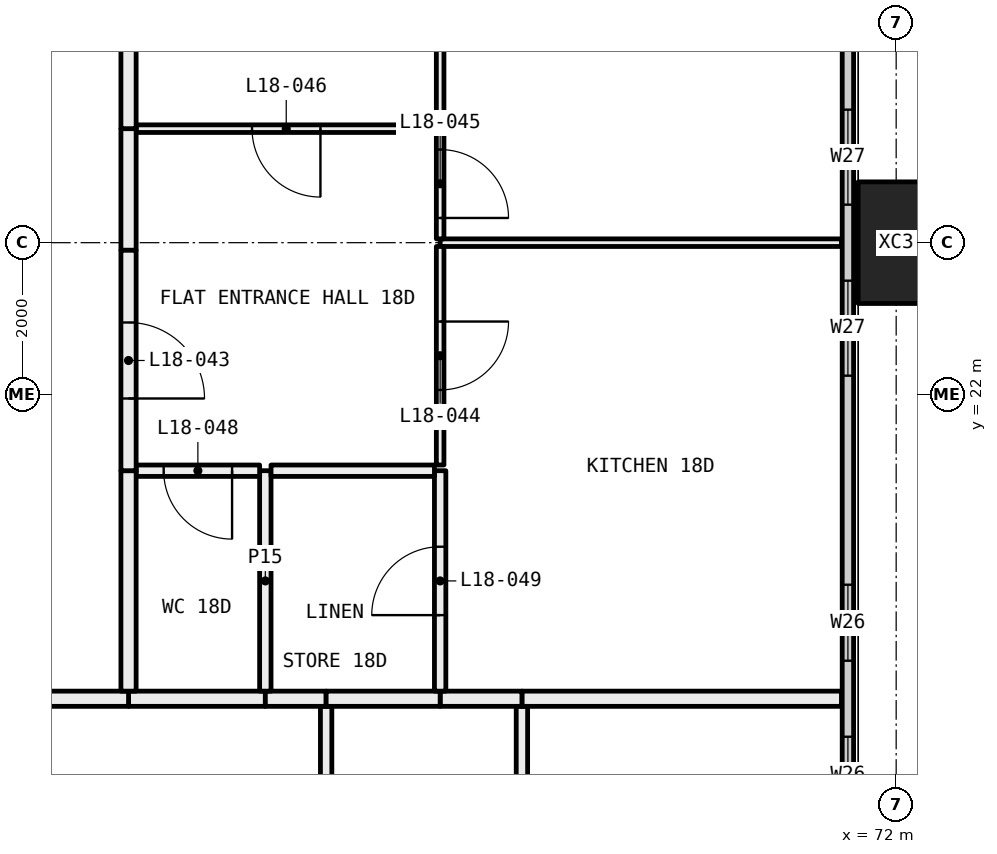
"""IFC4 building model, lengths in metres.
Left out: names, types, materials, properties, quantities, classifications, styles, units other than length and angle.
Written with IfcOpenShell. Run it as: python <this file> out.ifc"""

import sys

from ifc_helpers import new_model, si_unit, direction, frame, frame_2d, origin, origin_2d, place, context, subcontext, project, spatial, rectangle, hollow_rectangle, extrude, element, fill, save


model = new_model("IFC4")
c1 = context("Model", 3, precision=1e-05, world=origin(), true_north=direction((0.0, 1.0)))
c2 = subcontext(c1, "Body", "Model", "MODEL_VIEW")
j1 = project(units=[si_unit("LENGTHUNIT", "METRE"), si_unit("PLANEANGLEUNIT", "RADIAN")], contexts=[c1])
p1 = place(None, origin())
s1 = spatial("IfcSite", under=j1, at=p1, CompositionType="ELEMENT")
p2 = place(p1, origin())
s2 = spatial("IfcBuilding", under=s1, at=p2, CompositionType="ELEMENT")
p3 = place(p2, frame((0.0, 0.0, 74.85)))
s3 = spatial("IfcBuildingStorey", under=s2, at=p3, CompositionType="ELEMENT", Elevation=74.85)
p4 = place(p3, frame((72.0, 24.0, -0.4), z_axis=(0.0, 0.0, 1.0), x_axis=(0.0, 1.0, 0.0)))
e1 = element("IfcColumn", 1, at=p4, inside=s3, PredefinedType="COLUMN", context=c2, shape_type="SweptSolid", body=[
    extrude(hollow_rectangle(XDim=1.6, YDim=1.0, WallThickness=0.065, at=origin_2d()), origin(), (0.0, 0.0, 1.0), 3.45),
])
p5 = place(p3, frame((71.365, 6.71, 0.0), z_axis=(0.0, 0.0, 1.0), x_axis=(0.0, 1.0, 0.0)))
e2 = element("IfcWall", 2, at=p5, inside=s3, PredefinedType="ELEMENTEDWALL", context=c2, shape_type="SweptSolid", body=[
    extrude(rectangle(XDim=34.58, YDim=0.15, at=frame_2d((17.29, 0.0))), origin(), (0.0, 0.0, 1.0), 3.05),
])
p6 = place(p5, frame((0.29, 0.0, 0.45)))
e3 = element("IfcOpeningElement", 3, at=p6, cuts=e2, PredefinedType="OPENING", context=c2, shape_type="SweptSolid", body=[
    extrude(rectangle(XDim=4.5, YDim=2.55, at=frame_2d((2.25, 1.275))), frame((0.0, 0.085, 0.0), z_axis=(0.0, -1.0, 0.0), x_axis=(1.0, 0.0, 0.0)), (0.0, 0.0, 1.0), 0.17),
])
p7 = place(p5, frame((5.79, 0.0, 0.45)))
e4 = element("IfcOpeningElement", 4, at=p7, cuts=e2, PredefinedType="OPENING", context=c2, shape_type="SweptSolid", body=[
    extrude(rectangle(XDim=1.25, YDim=2.55, at=frame_2d((0.625, 1.275))), frame((0.0, 0.085, 0.0), z_axis=(0.0, -1.0, 0.0), x_axis=(1.0, 0.0, 0.0)), (0.0, 0.0, 1.0), 0.17),
])
p8 = place(p5, frame((9.79, 0.0, 0.45)))
e5 = element("IfcOpeningElement", 5, at=p8, cuts=e2, PredefinedType="OPENING", context=c2, shape_type="SweptSolid", body=[
    extrude(rectangle(XDim=1.0, YDim=2.55, at=frame_2d((0.5, 1.275))), frame((0.0, 0.085, 0.0), z_axis=(0.0, -1.0, 0.0), x_axis=(1.0, 0.0, 0.0)), (0.0, 0.0, 1.0), 0.17),
])
p9 = place(p5, frame((11.79, 0.0, 0.45)))
e6 = element("IfcOpeningElement", 6, at=p9, cuts=e2, PredefinedType="OPENING", context=c2, shape_type="SweptSolid", body=[
    extrude(rectangle(XDim=1.0, YDim=2.55, at=frame_2d((0.5, 1.275))), frame((0.0, 0.085, 0.0), z_axis=(0.0, -1.0, 0.0), x_axis=(1.0, 0.0, 0.0)), (0.0, 0.0, 1.0), 0.17),
])
p10 = place(p5, frame((15.54, 0.0, 0.45)))
e7 = element("IfcOpeningElement", 7, at=p10, cuts=e2, PredefinedType="OPENING", context=c2, shape_type="SweptSolid", body=[
    extrude(rectangle(XDim=1.25, YDim=2.55, at=frame_2d((0.625, 1.275))), frame((0.0, 0.085, 0.0), z_axis=(0.0, -1.0, 0.0), x_axis=(1.0, 0.0, 0.0)), (0.0, 0.0, 1.0), 0.17),
])
p11 = place(p5, frame((17.79, 0.0, 0.45)))
e8 = element("IfcOpeningElement", 8, at=p11, cuts=e2, PredefinedType="OPENING", context=c2, shape_type="SweptSolid", body=[
    extrude(rectangle(XDim=1.25, YDim=2.55, at=frame_2d((0.625, 1.275))), frame((0.0, 0.085, 0.0), z_axis=(0.0, -1.0, 0.0), x_axis=(1.0, 0.0, 0.0)), (0.0, 0.0, 1.0), 0.17),
])
p12 = place(p5, frame((21.79, 0.0, 0.45)))
e9 = element("IfcOpeningElement", 9, at=p12, cuts=e2, PredefinedType="OPENING", context=c2, shape_type="SweptSolid", body=[
    extrude(rectangle(XDim=1.0, YDim=2.55, at=frame_2d((0.5, 1.275))), frame((0.0, 0.085, 0.0), z_axis=(0.0, -1.0, 0.0), x_axis=(1.0, 0.0, 0.0)), (0.0, 0.0, 1.0), 0.17),
])
p13 = place(p5, frame((23.79, 0.0, 0.45)))
e10 = element("IfcOpeningElement", 10, at=p13, cuts=e2, PredefinedType="OPENING", context=c2, shape_type="SweptSolid", body=[
    extrude(rectangle(XDim=1.0, YDim=2.55, at=frame_2d((0.5, 1.275))), frame((0.0, 0.085, 0.0), z_axis=(0.0, -1.0, 0.0), x_axis=(1.0, 0.0, 0.0)), (0.0, 0.0, 1.0), 0.17),
])
p14 = place(p5, frame((27.54, 0.0, 0.45)))
e11 = element("IfcOpeningElement", 11, at=p14, cuts=e2, PredefinedType="OPENING", context=c2, shape_type="SweptSolid", body=[
    extrude(rectangle(XDim=1.25, YDim=2.55, at=frame_2d((0.625, 1.275))), frame((0.0, 0.085, 0.0), z_axis=(0.0, -1.0, 0.0), x_axis=(1.0, 0.0, 0.0)), (0.0, 0.0, 1.0), 0.17),
])
p15 = place(p5, frame((29.79, 0.0, 0.45)))
e12 = element("IfcOpeningElement", 12, at=p15, cuts=e2, PredefinedType="OPENING", context=c2, shape_type="SweptSolid", body=[
    extrude(rectangle(XDim=4.5, YDim=2.55, at=frame_2d((2.25, 1.275))), frame((0.0, 0.085, 0.0), z_axis=(0.0, -1.0, 0.0), x_axis=(1.0, 0.0, 0.0)), (0.0, 0.0, 1.0), 0.17),
])
p16 = place(p3, frame((64.5, 12.075, 0.0), z_axis=(0.0, 0.0, 1.0), x_axis=(0.0, 1.0, 0.0)))
e13 = element("IfcWall", 13, at=p16, inside=s3, PredefinedType="PARTITIONING", context=c2, shape_type="SweptSolid", body=[
    extrude(rectangle(XDim=5.825, YDim=0.15, at=frame_2d((2.913, 0.0))), origin(), (0.0, 0.0, 1.0), 2.45),
])
p17 = place(p3, frame((63.7, 18.0, 0.0), z_axis=(0.0, 0.0, 1.0), x_axis=(-1.0, 0.0, 0.0)))
e14 = element("IfcWall", 14, at=p17, inside=s3, PredefinedType="PARTITIONING", context=c2, shape_type="SweptSolid", body=[
    extrude(rectangle(XDim=1.8, YDim=0.2, at=frame_2d((0.9, 0.0))), origin(), (0.0, 0.0, 1.0), 3.05),
])
p18 = place(p3, frame((64.5, 18.0, 0.0), z_axis=(0.0, 0.0, 1.0), x_axis=(-1.0, 0.0, 0.0)))
e15 = element("IfcWall", 15, at=p18, inside=s3, PredefinedType="PARTITIONING", context=c2, shape_type="SweptSolid", body=[
    extrude(rectangle(XDim=0.8, YDim=0.2, at=frame_2d((0.4, 0.0))), origin(), (0.0, 0.0, 1.0), 3.05),
])
p19 = place(p3, frame((61.9, 18.0, 0.0), z_axis=(0.0, 0.0, 1.0), x_axis=(-1.0, 0.0, 0.0)))
e16 = element("IfcWall", 16, at=p19, inside=s3, PredefinedType="PARTITIONING", context=c2, shape_type="SweptSolid", body=[
    extrude(rectangle(XDim=4.9, YDim=0.2, at=frame_2d((2.45, 0.0))), origin(), (0.0, 0.0, 1.0), 3.05),
])
p20 = place(p3, frame((67.076, 17.9, 0.0), z_axis=(0.0, 0.0, 1.0), x_axis=(0.0, -1.0, 0.0)))
e17 = element("IfcWall", 17, at=p20, inside=s3, PredefinedType="PARTITIONING", context=c2, shape_type="SweptSolid", body=[
    extrude(rectangle(XDim=5.825, YDim=0.15, at=frame_2d((2.913, 0.0))), origin(), (0.0, 0.0, 1.0), 2.45),
])
p21 = place(p3, frame((71.28, 18.0, 0.0), z_axis=(0.0, 0.0, 1.0), x_axis=(-1.0, 0.0, 0.0)))
e18 = element("IfcWall", 18, at=p21, inside=s3, PredefinedType="PARTITIONING", context=c2, shape_type="SweptSolid", body=[
    extrude(rectangle(XDim=4.204, YDim=0.2, at=frame_2d((2.102, 0.0))), origin(), (0.0, 0.0, 1.0), 3.05),
])
p22 = place(p3, frame((67.076, 18.0, 0.0), z_axis=(0.0, 0.0, 1.0), x_axis=(-1.0, 0.0, 0.0)))
e19 = element("IfcWall", 19, at=p22, inside=s3, PredefinedType="PARTITIONING", context=c2, shape_type="SweptSolid", body=[
    extrude(rectangle(XDim=1.076, YDim=0.2, at=frame_2d((0.538, 0.0))), origin(), (0.0, 0.0, 1.0), 3.05),
])
p23 = place(p3, frame((66.0, 18.0, 0.0), z_axis=(0.0, 0.0, 1.0), x_axis=(-1.0, 0.0, 0.0)))
e20 = element("IfcWall", 20, at=p23, inside=s3, PredefinedType="PARTITIONING", context=c2, shape_type="SweptSolid", body=[
    extrude(rectangle(XDim=1.5, YDim=0.2, at=frame_2d((0.75, 0.0))), origin(), (0.0, 0.0, 1.0), 3.05),
])
p24 = place(p3, frame((71.28, 24.0, 0.0), z_axis=(0.0, 0.0, 1.0), x_axis=(-1.0, 0.0, 0.0)))
e21 = element("IfcWall", 21, at=p24, inside=s3, PredefinedType="PARTITIONING", context=c2, shape_type="SweptSolid", body=[
    extrude(rectangle(XDim=5.28, YDim=0.1, at=frame_2d((2.64, 0.0))), origin(), (0.0, 0.0, 1.0), 2.45),
])
p25 = place(p3, frame((66.0, 21.0, 0.0), z_axis=(0.0, 0.0, 1.0), x_axis=(0.0, -1.0, 0.0)))
e22 = element("IfcWall", 22, at=p25, inside=s3, PredefinedType="PARTITIONING", context=c2, shape_type="SweptSolid", body=[
    extrude(rectangle(XDim=2.9, YDim=0.15, at=frame_2d((1.45, 0.0))), origin(), (0.0, 0.0, 1.0), 3.05),
])
p26 = place(p25, frame((1.0, 0.0, 0.0)))
e23 = element("IfcOpeningElement", 23, at=p26, cuts=e22, PredefinedType="OPENING", context=c2, shape_type="SweptSolid", body=[
    extrude(rectangle(XDim=0.9, YDim=2.1, at=frame_2d((0.45, 1.05))), frame((0.0, 0.085, 0.0), z_axis=(0.0, -1.0, 0.0), x_axis=(1.0, 0.0, 0.0)), (0.0, 0.0, 1.0), 0.17),
])
p27 = place(p3, frame((66.0, 23.95, 0.0), z_axis=(0.0, 0.0, 1.0), x_axis=(0.0, -1.0, 0.0)))
e24 = element("IfcWall", 24, at=p27, inside=s3, PredefinedType="PARTITIONING", context=c2, shape_type="SweptSolid", body=[
    extrude(rectangle(XDim=2.875, YDim=0.1, at=frame_2d((1.438, 0.0))), origin(), (0.0, 0.0, 1.0), 2.45),
])
p28 = place(p27, frame((0.988, 0.0, 0.0)))
e25 = element("IfcOpeningElement", 25, at=p28, cuts=e24, PredefinedType="OPENING", context=c2, shape_type="SweptSolid", body=[
    extrude(rectangle(XDim=0.9, YDim=2.1, at=frame_2d((0.45, 1.05))), frame((0.0, 0.06, 0.0), z_axis=(0.0, -1.0, 0.0), x_axis=(1.0, 0.0, 0.0)), (0.0, 0.0, 1.0), 0.12),
])
p29 = place(p3, frame((66.0, 25.5, 0.0), z_axis=(0.0, 0.0, 1.0), x_axis=(0.0, -1.0, 0.0)))
e26 = element("IfcWall", 26, at=p29, inside=s3, PredefinedType="PARTITIONING", context=c2, shape_type="SweptSolid", body=[
    extrude(rectangle(XDim=1.45, YDim=0.1, at=frame_2d((0.725, 0.0))), origin(), (0.0, 0.0, 1.0), 2.45),
])
p30 = place(p29, frame((0.275, 0.0, 0.0)))
e27 = element("IfcOpeningElement", 27, at=p30, cuts=e26, PredefinedType="OPENING", context=c2, shape_type="SweptSolid", body=[
    extrude(rectangle(XDim=0.9, YDim=2.1, at=frame_2d((0.45, 1.05))), frame((0.0, 0.06, 0.0), z_axis=(0.0, -1.0, 0.0), x_axis=(1.0, 0.0, 0.0)), (0.0, 0.0, 1.0), 0.12),
])
p31 = place(p3, frame((66.0, 35.95, 0.0), z_axis=(0.0, 0.0, 1.0), x_axis=(0.0, -1.0, 0.0)))
e28 = element("IfcWall", 28, at=p31, inside=s3, PredefinedType="PARTITIONING", context=c2, shape_type="SweptSolid", body=[
    extrude(rectangle(XDim=10.45, YDim=0.1, at=frame_2d((5.225, 0.0))), origin(), (0.0, 0.0, 1.0), 2.45),
])
p32 = place(p3, frame((63.7, 18.1, 0.0), z_axis=(0.0, 0.0, 1.0), x_axis=(0.0, 1.0, 0.0)))
e29 = element("IfcWall", 29, at=p32, inside=s3, PredefinedType="PARTITIONING", context=c2, shape_type="SweptSolid", body=[
    extrude(rectangle(XDim=2.9, YDim=0.15, at=frame_2d((1.45, 0.0))), origin(), (0.0, 0.0, 1.0), 3.05),
])
p33 = place(p3, frame((63.625, 21.0, 0.0), z_axis=(0.0, 0.0, 1.0), x_axis=(-1.0, 0.0, 0.0)))
e30 = element("IfcWall", 30, at=p33, inside=s3, PredefinedType="PARTITIONING", context=c2, shape_type="SweptSolid", body=[
    extrude(rectangle(XDim=1.625, YDim=0.15, at=frame_2d((0.812, 0.0))), origin(), (0.0, 0.0, 1.0), 3.05),
])
p34 = place(p33, frame((0.363, 0.0, 0.0)))
e31 = element("IfcOpeningElement", 31, at=p34, cuts=e30, PredefinedType="OPENING", context=c2, shape_type="SweptSolid", body=[
    extrude(rectangle(XDim=0.9, YDim=2.1, at=frame_2d((0.45, 1.05))), frame((0.0, 0.085, 0.0), z_axis=(0.0, -1.0, 0.0), x_axis=(1.0, 0.0, 0.0)), (0.0, 0.0, 1.0), 0.17),
])
p35 = place(p3, frame((61.9, 21.0, 0.0), z_axis=(0.0, 0.0, 1.0), x_axis=(0.0, -1.0, 0.0)))
e32 = element("IfcWall", 32, at=p35, inside=s3, PredefinedType="PARTITIONING", context=c2, shape_type="SweptSolid", body=[
    extrude(rectangle(XDim=2.9, YDim=0.2, at=frame_2d((1.45, 0.0))), origin(), (0.0, 0.0, 1.0), 3.05),
])
p36 = place(p3, frame((65.925, 21.0, 0.0), z_axis=(0.0, 0.0, 1.0), x_axis=(-1.0, 0.0, 0.0)))
e33 = element("IfcWall", 33, at=p36, inside=s3, PredefinedType="PARTITIONING", context=c2, shape_type="SweptSolid", body=[
    extrude(rectangle(XDim=2.15, YDim=0.15, at=frame_2d((1.075, 0.0))), origin(), (0.0, 0.0, 1.0), 3.05),
])
p37 = place(p3, frame((65.95, 25.5, 0.0), z_axis=(0.0, 0.0, 1.0), x_axis=(-1.0, 0.0, 0.0)))
e34 = element("IfcWall", 34, at=p37, inside=s3, PredefinedType="PARTITIONING", context=c2, shape_type="SweptSolid", body=[
    extrude(rectangle(XDim=3.95, YDim=0.1, at=frame_2d((1.975, 0.0))), origin(), (0.0, 0.0, 1.0), 3.05),
])
p38 = place(p37, frame((1.525, 0.0, 0.0)))
e35 = element("IfcOpeningElement", 35, at=p38, cuts=e34, PredefinedType="OPENING", context=c2, shape_type="SweptSolid", body=[
    extrude(rectangle(XDim=0.9, YDim=2.1, at=frame_2d((0.45, 1.05))), frame((0.0, 0.06, 0.0), z_axis=(0.0, -1.0, 0.0), x_axis=(1.0, 0.0, 0.0)), (0.0, 0.0, 1.0), 0.12),
])
p39 = place(p3, frame((61.9, 25.5, 0.0), z_axis=(0.0, 0.0, 1.0), x_axis=(0.0, -1.0, 0.0)))
e36 = element("IfcWall", 36, at=p39, inside=s3, PredefinedType="PARTITIONING", context=c2, shape_type="SweptSolid", body=[
    extrude(rectangle(XDim=1.6, YDim=0.2, at=frame_2d((0.8, 0.0))), origin(), (0.0, 0.0, 1.0), 2.45),
])
p40 = place(p3, frame((61.9, 23.9, 0.0), z_axis=(0.0, 0.0, 1.0), x_axis=(0.0, -1.0, 0.0)))
e37 = element("IfcWall", 37, at=p40, inside=s3, PredefinedType="PARTITIONING", context=c2, shape_type="SweptSolid", body=[
    extrude(rectangle(XDim=2.9, YDim=0.2, at=frame_2d((1.45, 0.0))), origin(), (0.0, 0.0, 1.0), 3.05),
])
p41 = place(p40, frame((0.95, 0.0, 0.0)))
e38 = element("IfcOpeningElement", 38, at=p41, cuts=e37, PredefinedType="OPENING", context=c2, shape_type="SweptSolid", body=[
    extrude(rectangle(XDim=1.0, YDim=2.1, at=frame_2d((0.5, 1.05))), frame((0.0, 0.11, 0.0), z_axis=(0.0, -1.0, 0.0), x_axis=(1.0, 0.0, 0.0)), (0.0, 0.0, 1.0), 0.22),
])
p42 = place(p3, frame((61.9, 35.9, 0.0), z_axis=(0.0, 0.0, 1.0), x_axis=(0.0, -1.0, 0.0)))
e39 = element("IfcWall", 39, at=p42, inside=s3, PredefinedType="PARTITIONING", context=c2, shape_type="SweptSolid", body=[
    extrude(rectangle(XDim=10.4, YDim=0.2, at=frame_2d((5.2, 0.0))), origin(), (0.0, 0.0, 1.0), 3.05),
])
p43 = place(p8, origin())
e40 = element("IfcWindow", 40, at=p43, inside=s3, PartitioningType="SINGLE_PANEL", PredefinedType="WINDOW", context=c2, shape_type="SweptSolid", body=[
    extrude(rectangle(XDim=1.0, YDim=2.55, at=frame_2d((0.5, 1.275))), frame((0.0, 0.03, 0.0), z_axis=(0.0, -1.0, 0.0), x_axis=(1.0, 0.0, 0.0)), (0.0, 0.0, 1.0), 0.06),
])
fill(e5, e40)
p44 = place(p9, origin())
e41 = element("IfcWindow", 41, at=p44, inside=s3, PartitioningType="SINGLE_PANEL", PredefinedType="WINDOW", context=c2, shape_type="SweptSolid", body=[
    extrude(rectangle(XDim=1.0, YDim=2.55, at=frame_2d((0.5, 1.275))), frame((0.0, 0.03, 0.0), z_axis=(0.0, -1.0, 0.0), x_axis=(1.0, 0.0, 0.0)), (0.0, 0.0, 1.0), 0.06),
])
fill(e6, e41)
p45 = place(p10, origin())
e42 = element("IfcWindow", 42, at=p45, inside=s3, PartitioningType="SINGLE_PANEL", PredefinedType="WINDOW", context=c2, shape_type="SweptSolid", body=[
    extrude(rectangle(XDim=1.25, YDim=2.55, at=frame_2d((0.625, 1.275))), frame((0.0, 0.03, 0.0), z_axis=(0.0, -1.0, 0.0), x_axis=(1.0, 0.0, 0.0)), (0.0, 0.0, 1.0), 0.06),
])
fill(e7, e42)
p46 = place(p11, origin())
e43 = element("IfcWindow", 43, at=p46, inside=s3, PartitioningType="SINGLE_PANEL", PredefinedType="WINDOW", context=c2, shape_type="SweptSolid", body=[
    extrude(rectangle(XDim=1.25, YDim=2.55, at=frame_2d((0.625, 1.275))), frame((0.0, 0.03, 0.0), z_axis=(0.0, -1.0, 0.0), x_axis=(1.0, 0.0, 0.0)), (0.0, 0.0, 1.0), 0.06),
])
fill(e8, e43)
p47 = place(p41, origin())
e44 = element("IfcDoor", 44, at=p47, inside=s3, OperationType="SINGLE_SWING_LEFT", PredefinedType="DOOR", context=c2, shape_type="SweptSolid", body=[
    extrude(rectangle(XDim=1.0, YDim=2.1, at=frame_2d((0.5, 1.05))), frame((0.0, 0.025, 0.0), z_axis=(0.0, -1.0, 0.0), x_axis=(1.0, 0.0, 0.0)), (0.0, 0.0, 1.0), 0.05),
])
fill(e38, e44)
p48 = place(p28, origin())
e45 = element("IfcDoor", 45, at=p48, inside=s3, OperationType="SINGLE_SWING_RIGHT", PredefinedType="DOOR", context=c2, shape_type="SweptSolid", body=[
    extrude(rectangle(XDim=0.9, YDim=2.1, at=frame_2d((0.45, 1.05))), frame((0.0, 0.025, 0.0), z_axis=(0.0, -1.0, 0.0), x_axis=(1.0, 0.0, 0.0)), (0.0, 0.0, 1.0), 0.05),
])
fill(e25, e45)
p49 = place(p30, origin())
e46 = element("IfcDoor", 46, at=p49, inside=s3, OperationType="SINGLE_SWING_LEFT", PredefinedType="DOOR", context=c2, shape_type="SweptSolid", body=[
    extrude(rectangle(XDim=0.9, YDim=2.1, at=frame_2d((0.45, 1.05))), frame((0.0, 0.025, 0.0), z_axis=(0.0, -1.0, 0.0), x_axis=(1.0, 0.0, 0.0)), (0.0, 0.0, 1.0), 0.05),
])
fill(e27, e46)
p50 = place(p38, origin())
e47 = element("IfcDoor", 47, at=p50, inside=s3, OperationType="SINGLE_SWING_RIGHT", PredefinedType="DOOR", context=c2, shape_type="SweptSolid", body=[
    extrude(rectangle(XDim=0.9, YDim=2.1, at=frame_2d((0.45, 1.05))), frame((0.0, 0.025, 0.0), z_axis=(0.0, -1.0, 0.0), x_axis=(1.0, 0.0, 0.0)), (0.0, 0.0, 1.0), 0.05),
])
fill(e35, e47)
p51 = place(p34, origin())
e48 = element("IfcDoor", 48, at=p51, inside=s3, OperationType="SINGLE_SWING_RIGHT", PredefinedType="DOOR", context=c2, shape_type="SweptSolid", body=[
    extrude(rectangle(XDim=0.9, YDim=2.1, at=frame_2d((0.45, 1.05))), frame((0.0, 0.025, 0.0), z_axis=(0.0, -1.0, 0.0), x_axis=(1.0, 0.0, 0.0)), (0.0, 0.0, 1.0), 0.05),
])
fill(e31, e48)
p52 = place(p26, frame((0.9, 0.0, 0.0), x_axis=(-1.0, 0.0, 0.0)))
e49 = element("IfcDoor", 49, at=p52, inside=s3, OperationType="SINGLE_SWING_RIGHT", PredefinedType="DOOR", context=c2, shape_type="SweptSolid", body=[
    extrude(rectangle(XDim=0.9, YDim=2.1, at=frame_2d((0.45, 1.05))), frame((0.0, 0.025, 0.0), z_axis=(0.0, -1.0, 0.0), x_axis=(1.0, 0.0, 0.0)), (0.0, 0.0, 1.0), 0.05),
])
fill(e23, e49)
save(model, sys.argv[1])
